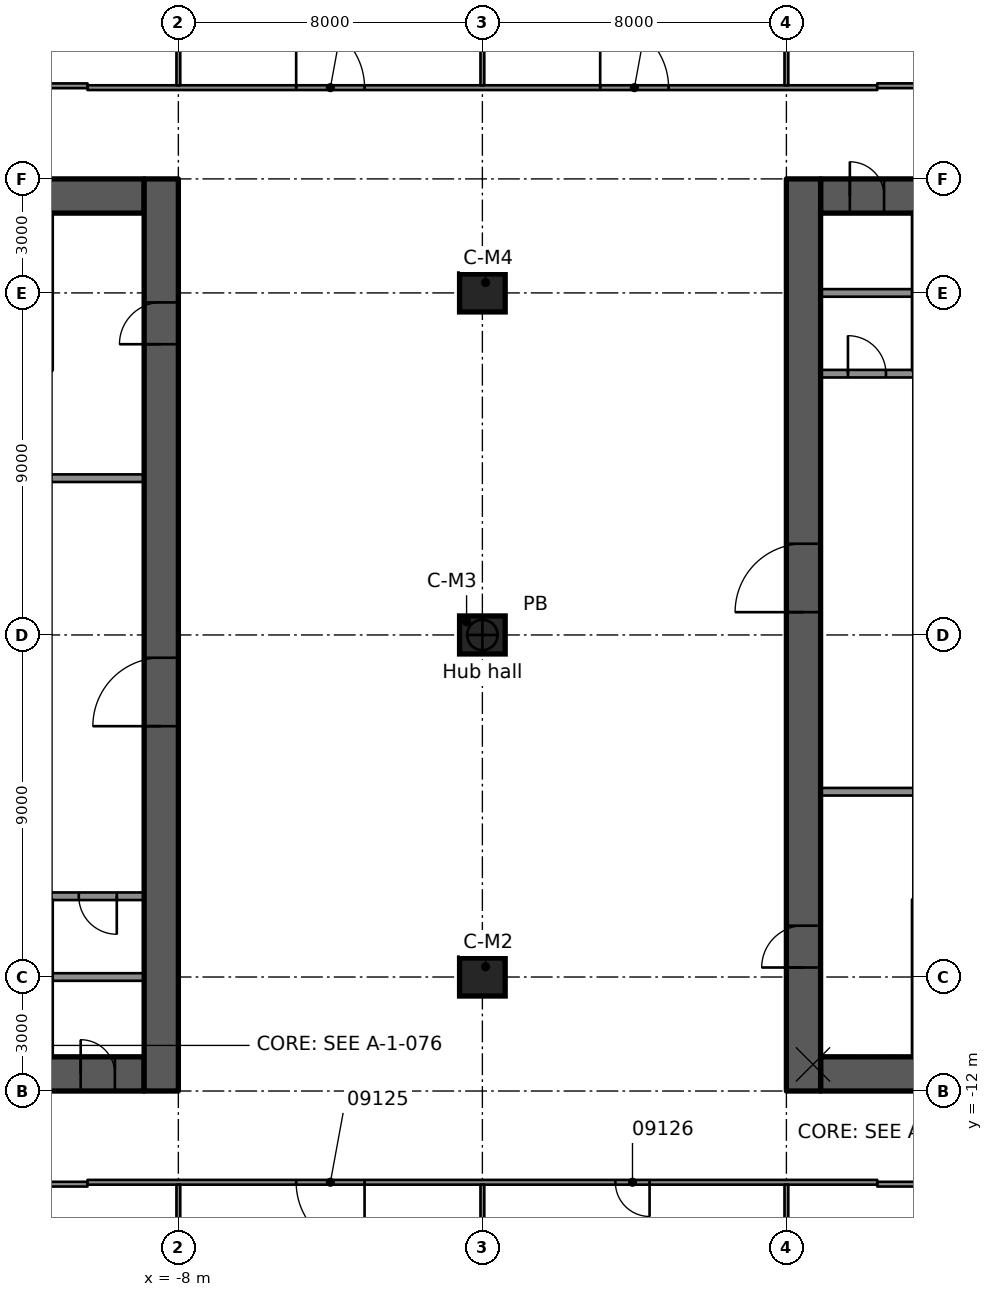
"""IFC4 building model, lengths in metres.
Left out: names, types, materials, properties, quantities, classifications, styles, units other than length and angle.
Written with IfcOpenShell. Run it as: python <this file> out.ifc"""

import sys

from ifc_helpers import new_model, si_unit, direction, frame, frame_2d, origin, origin_2d, place, context, subcontext, project, spatial, rectangle, extrude, element, fill, save


model = new_model("IFC4")
c1 = context("Model", 3, precision=1e-05, world=origin(), true_north=direction((0.0, 1.0)))
c2 = subcontext(c1, "Body", "Model", "MODEL_VIEW")
j1 = project(units=[si_unit("LENGTHUNIT", "METRE"), si_unit("PLANEANGLEUNIT", "RADIAN")], contexts=[c1])
p1 = place(None, origin())
s1 = spatial("IfcSite", under=j1, at=p1, CompositionType="ELEMENT")
p2 = place(p1, origin())
s2 = spatial("IfcBuilding", under=s1, at=p2, CompositionType="ELEMENT")
p3 = place(p2, frame((0.0, 0.0, 40.8)))
s3 = spatial("IfcBuildingStorey", under=s2, at=p3, CompositionType="ELEMENT", Elevation=40.8)
p4 = place(p3, frame((-18.1, 11.55, 0.0), z_axis=(0.0, 0.0, 1.0), x_axis=(1.0, 0.0, 0.0)))
e1 = element("IfcWall", 1, at=p4, inside=s3, PredefinedType="SHEAR", context=c2, shape_type="SweptSolid", body=[
    extrude(rectangle(XDim=9.2, YDim=0.9, at=frame_2d((4.6, 0.0))), origin(), (0.0, 0.0, 1.0), 3.5),
])
p5 = place(p4, frame((5.1, 0.0, 0.0)))
e2 = element("IfcOpeningElement", 2, at=p5, cuts=e1, PredefinedType="OPENING", context=c2, shape_type="SweptSolid", body=[
    extrude(rectangle(XDim=1.1, YDim=2.1, at=frame_2d((0.55, 1.05))), frame((0.0, 0.46, 0.0), z_axis=(0.0, -1.0, 0.0), x_axis=(1.0, 0.0, 0.0)), (0.0, 0.0, 1.0), 0.92),
])
p6 = place(p3, frame((-18.1, -11.55, 0.0), z_axis=(0.0, 0.0, 1.0), x_axis=(1.0, 0.0, 0.0)))
e3 = element("IfcWall", 3, at=p6, inside=s3, PredefinedType="SHEAR", context=c2, shape_type="SweptSolid", body=[
    extrude(rectangle(XDim=9.2, YDim=0.9, at=frame_2d((4.6, 0.0))), origin(), (0.0, 0.0, 1.0), 3.5),
])
p7 = place(p6, frame((5.1, 0.0, 0.0)))
e4 = element("IfcOpeningElement", 4, at=p7, cuts=e3, PredefinedType="OPENING", context=c2, shape_type="SweptSolid", body=[
    extrude(rectangle(XDim=1.1, YDim=2.1, at=frame_2d((0.55, 1.05))), frame((0.0, 0.46, 0.0), z_axis=(0.0, -1.0, 0.0), x_axis=(1.0, 0.0, 0.0)), (0.0, 0.0, 1.0), 0.92),
])
p8 = place(p6, frame((7.53, 0.0, 0.0)))
e5 = element("IfcOpeningElement", 5, at=p8, cuts=e3, PredefinedType="OPENING", context=c2, shape_type="SweptSolid", body=[
    extrude(rectangle(XDim=0.9, YDim=2.1, at=frame_2d((0.45, 1.05))), frame((0.0, 0.46, 0.0), z_axis=(0.0, -1.0, 0.0), x_axis=(1.0, 0.0, 0.0)), (0.0, 0.0, 1.0), 0.92),
])
p9 = place(p3, frame((-8.45, -12.0, 0.0), z_axis=(0.0, 0.0, 1.0), x_axis=(0.0, 1.0, 0.0)))
e6 = element("IfcWall", 6, at=p9, inside=s3, PredefinedType="SHEAR", context=c2, shape_type="SweptSolid", body=[
    extrude(rectangle(XDim=24.0, YDim=0.9, at=frame_2d((12.0, 0.0))), origin(), (0.0, 0.0, 1.0), 3.5),
])
p10 = place(p9, frame((9.6, 0.0, 0.0)))
e7 = element("IfcOpeningElement", 7, at=p10, cuts=e6, PredefinedType="OPENING", context=c2, shape_type="SweptSolid", body=[
    extrude(rectangle(XDim=1.8, YDim=2.1, at=frame_2d((0.9, 1.05))), frame((0.0, 0.46, 0.0), z_axis=(0.0, -1.0, 0.0), x_axis=(1.0, 0.0, 0.0)), (0.0, 0.0, 1.0), 0.92),
])
p11 = place(p9, frame((19.65, 0.0, 0.0)))
e8 = element("IfcOpeningElement", 8, at=p11, cuts=e6, PredefinedType="OPENING", context=c2, shape_type="SweptSolid", body=[
    extrude(rectangle(XDim=1.1, YDim=2.1, at=frame_2d((0.55, 1.05))), frame((0.0, 0.46, 0.0), z_axis=(0.0, -1.0, 0.0), x_axis=(1.0, 0.0, 0.0)), (0.0, 0.0, 1.0), 0.92),
])
p12 = place(p3, frame((8.9, 11.55, 0.0), z_axis=(0.0, 0.0, 1.0), x_axis=(1.0, 0.0, 0.0)))
e9 = element("IfcWall", 9, at=p12, inside=s3, PredefinedType="SHEAR", context=c2, shape_type="SweptSolid", body=[
    extrude(rectangle(XDim=9.2, YDim=0.9, at=frame_2d((4.6, 0.0))), origin(), (0.0, 0.0, 1.0), 3.5),
])
p13 = place(p12, frame((3.0, 0.0, 0.0)))
e10 = element("IfcOpeningElement", 10, at=p13, cuts=e9, PredefinedType="OPENING", context=c2, shape_type="SweptSolid", body=[
    extrude(rectangle(XDim=1.1, YDim=2.1, at=frame_2d((0.55, 1.05))), frame((0.0, 0.46, 0.0), z_axis=(0.0, -1.0, 0.0), x_axis=(1.0, 0.0, 0.0)), (0.0, 0.0, 1.0), 0.92),
])
p14 = place(p12, frame((0.77, 0.0, 0.0)))
e11 = element("IfcOpeningElement", 11, at=p14, cuts=e9, PredefinedType="OPENING", context=c2, shape_type="SweptSolid", body=[
    extrude(rectangle(XDim=0.9, YDim=2.1, at=frame_2d((0.45, 1.05))), frame((0.0, 0.46, 0.0), z_axis=(0.0, -1.0, 0.0), x_axis=(1.0, 0.0, 0.0)), (0.0, 0.0, 1.0), 0.92),
])
p15 = place(p3, frame((8.9, -11.55, 0.0), z_axis=(0.0, 0.0, 1.0), x_axis=(1.0, 0.0, 0.0)))
e12 = element("IfcWall", 12, at=p15, inside=s3, PredefinedType="SHEAR", context=c2, shape_type="SweptSolid", body=[
    extrude(rectangle(XDim=9.2, YDim=0.9, at=frame_2d((4.6, 0.0))), origin(), (0.0, 0.0, 1.0), 3.5),
])
p16 = place(p15, frame((3.0, 0.0, 0.0)))
e13 = element("IfcOpeningElement", 13, at=p16, cuts=e12, PredefinedType="OPENING", context=c2, shape_type="SweptSolid", body=[
    extrude(rectangle(XDim=1.1, YDim=2.1, at=frame_2d((0.55, 1.05))), frame((0.0, 0.46, 0.0), z_axis=(0.0, -1.0, 0.0), x_axis=(1.0, 0.0, 0.0)), (0.0, 0.0, 1.0), 0.92),
])
p17 = place(p3, frame((8.45, -12.0, 0.0), z_axis=(0.0, 0.0, 1.0), x_axis=(0.0, 1.0, 0.0)))
e14 = element("IfcWall", 14, at=p17, inside=s3, PredefinedType="SHEAR", context=c2, shape_type="SweptSolid", body=[
    extrude(rectangle(XDim=24.0, YDim=0.9, at=frame_2d((12.0, 0.0))), origin(), (0.0, 0.0, 1.0), 3.5),
])
p18 = place(p17, frame((12.6, 0.0, 0.0)))
e15 = element("IfcOpeningElement", 15, at=p18, cuts=e14, PredefinedType="OPENING", context=c2, shape_type="SweptSolid", body=[
    extrude(rectangle(XDim=1.8, YDim=2.1, at=frame_2d((0.9, 1.05))), frame((0.0, 0.46, 0.0), z_axis=(0.0, -1.0, 0.0), x_axis=(1.0, 0.0, 0.0)), (0.0, 0.0, 1.0), 0.92),
])
p19 = place(p17, frame((3.25, 0.0, 0.0)))
e16 = element("IfcOpeningElement", 16, at=p19, cuts=e14, PredefinedType="OPENING", context=c2, shape_type="SweptSolid", body=[
    extrude(rectangle(XDim=1.1, YDim=2.1, at=frame_2d((0.55, 1.05))), frame((0.0, 0.46, 0.0), z_axis=(0.0, -1.0, 0.0), x_axis=(1.0, 0.0, 0.0)), (0.0, 0.0, 1.0), 0.92),
])
for number, where, z_axis, x_axis in (
    (17, (0.0, -9.0, 0.0), (0.0, 0.0, 1.0), (1.0, 0.0, 0.0)),
    (18, (0.0, 0.0, 0.0), (0.0, 0.0, 1.0), (1.0, 0.0, 0.0)),
    (19, (0.0, 9.0, 0.0), (0.0, 0.0, 1.0), (1.0, 0.0, 0.0)),
):
    element("IfcColumn", number, at=place(p3, frame(where, z_axis=z_axis, x_axis=x_axis)), inside=s3, PredefinedType="COLUMN", context=c2, shape_type="SweptSolid", body=[
        extrude(rectangle(XDim=1.2, YDim=1.0, at=origin_2d()), origin(), (0.0, 0.0, 1.0), 3.5),
    ])
p20 = place(p3, frame((-8.9, 4.125, 0.0), z_axis=(0.0, 0.0, 1.0), x_axis=(-1.0, 0.0, 0.0)))
e20 = element("IfcWall", 20, at=p20, inside=s3, PredefinedType="PARTITIONING", context=c2, shape_type="SweptSolid", body=[
    extrude(rectangle(XDim=2.44, YDim=0.2, at=frame_2d((1.22, 0.0))), origin(), (0.0, 0.0, 1.0), 3.08),
])
p21 = place(p3, frame((-8.9, -6.875, 0.0), z_axis=(0.0, 0.0, 1.0), x_axis=(-1.0, 0.0, 0.0)))
e21 = element("IfcWall", 21, at=p21, inside=s3, PredefinedType="PARTITIONING", context=c2, shape_type="SweptSolid", body=[
    extrude(rectangle(XDim=2.44, YDim=0.2, at=frame_2d((1.22, 0.0))), origin(), (0.0, 0.0, 1.0), 3.08),
])
p22 = place(p21, frame((0.72, 0.0, 0.0)))
e22 = element("IfcOpeningElement", 22, at=p22, cuts=e21, PredefinedType="OPENING", context=c2, shape_type="SweptSolid", body=[
    extrude(rectangle(XDim=1.0, YDim=2.1, at=frame_2d((0.5, 1.05))), frame((0.0, 0.11, 0.0), z_axis=(0.0, -1.0, 0.0), x_axis=(1.0, 0.0, 0.0)), (0.0, 0.0, 1.0), 0.22),
])
for number, where, z_axis, x_axis in (
    (23, (-8.9, -9.0, 0.0), (0.0, 0.0, 1.0), (-1.0, 0.0, 0.0)),
    (24, (8.9, -4.125, 0.0), (0.0, 0.0, 1.0), (1.0, 0.0, 0.0)),
):
    element("IfcWall", number, at=place(p3, frame(where, z_axis=z_axis, x_axis=x_axis)), inside=s3, PredefinedType="PARTITIONING", context=c2, shape_type="SweptSolid", body=[
        extrude(rectangle(XDim=2.44, YDim=0.2, at=frame_2d((1.22, 0.0))), origin(), (0.0, 0.0, 1.0), 3.08),
    ])
p23 = place(p3, frame((8.9, 6.875, 0.0), z_axis=(0.0, 0.0, 1.0), x_axis=(1.0, 0.0, 0.0)))
e25 = element("IfcWall", 25, at=p23, inside=s3, PredefinedType="PARTITIONING", context=c2, shape_type="SweptSolid", body=[
    extrude(rectangle(XDim=2.44, YDim=0.2, at=frame_2d((1.22, 0.0))), origin(), (0.0, 0.0, 1.0), 3.08),
])
p24 = place(p23, frame((0.72, 0.0, 0.0)))
e26 = element("IfcOpeningElement", 26, at=p24, cuts=e25, PredefinedType="OPENING", context=c2, shape_type="SweptSolid", body=[
    extrude(rectangle(XDim=1.0, YDim=2.1, at=frame_2d((0.5, 1.05))), frame((0.0, 0.11, 0.0), z_axis=(0.0, -1.0, 0.0), x_axis=(1.0, 0.0, 0.0)), (0.0, 0.0, 1.0), 0.22),
])
p25 = place(p3, frame((8.9, 9.0, 0.0), z_axis=(0.0, 0.0, 1.0), x_axis=(1.0, 0.0, 0.0)))
e27 = element("IfcWall", 27, at=p25, inside=s3, PredefinedType="PARTITIONING", context=c2, shape_type="SweptSolid", body=[
    extrude(rectangle(XDim=2.44, YDim=0.2, at=frame_2d((1.22, 0.0))), origin(), (0.0, 0.0, 1.0), 3.08),
])
p26 = place(p3, frame((-10.391, -14.451, 0.0), z_axis=(0.0, 0.0, 1.0), x_axis=(-1.0, 0.0, 0.0)))
e28 = element("IfcWall", 28, at=p26, inside=s3, PredefinedType="PARTITIONING", context=c2, shape_type="SweptSolid", body=[
    extrude(rectangle(XDim=4.947, YDim=0.125, at=frame_2d((2.473, 0.0))), origin(), (0.0, 0.0, 1.0), 3.06),
])
p27 = place(p26, frame((1.6, 0.0, 0.0)))
e29 = element("IfcOpeningElement", 29, at=p27, cuts=e28, PredefinedType="OPENING", context=c2, shape_type="SweptSolid", body=[
    extrude(rectangle(XDim=1.8, YDim=2.1, at=frame_2d((0.9, 1.05))), frame((0.0, 0.073, 0.0), z_axis=(0.0, -1.0, 0.0), x_axis=(1.0, 0.0, 0.0)), (0.0, 0.0, 1.0), 0.145),
])
p28 = place(p3, frame((17.519, -14.451, 0.0), z_axis=(0.0, 0.0, 1.0), x_axis=(-1.0, 0.0, 0.0)))
e30 = element("IfcWall", 30, at=p28, inside=s3, PredefinedType="PARTITIONING", context=c2, shape_type="SweptSolid", body=[
    extrude(rectangle(XDim=7.128, YDim=0.125, at=frame_2d((3.564, 0.0))), origin(), (0.0, 0.0, 1.0), 3.06),
])
p29 = place(p28, frame((3.1, 0.0, 0.0)))
e31 = element("IfcOpeningElement", 31, at=p29, cuts=e30, PredefinedType="OPENING", context=c2, shape_type="SweptSolid", body=[
    extrude(rectangle(XDim=0.9, YDim=2.1, at=frame_2d((0.45, 1.05))), frame((0.0, 0.073, 0.0), z_axis=(0.0, -1.0, 0.0), x_axis=(1.0, 0.0, 0.0)), (0.0, 0.0, 1.0), 0.145),
])
p30 = place(p3, frame((10.391, -14.401, 0.0), z_axis=(0.0, 0.0, 1.0), x_axis=(-1.0, 0.0, 0.0)))
e32 = element("IfcWall", 32, at=p30, inside=s3, PredefinedType="PARTITIONING", context=c2, shape_type="SweptSolid", body=[
    extrude(rectangle(XDim=20.781, YDim=0.125, at=frame_2d((10.391, 0.0))), origin(), (0.0, 0.0, 1.0), 3.06),
])
p31 = place(p30, frame((13.491, 0.0, 0.0)))
e33 = element("IfcOpeningElement", 33, at=p31, cuts=e32, PredefinedType="OPENING", context=c2, shape_type="SweptSolid", body=[
    extrude(rectangle(XDim=1.8, YDim=2.1, at=frame_2d((0.9, 1.05))), frame((0.0, 0.073, 0.0), z_axis=(0.0, -1.0, 0.0), x_axis=(1.0, 0.0, 0.0)), (0.0, 0.0, 1.0), 0.145),
])
p32 = place(p30, frame((5.991, 0.0, 0.0)))
e34 = element("IfcOpeningElement", 34, at=p32, cuts=e32, PredefinedType="OPENING", context=c2, shape_type="SweptSolid", body=[
    extrude(rectangle(XDim=0.9, YDim=2.1, at=frame_2d((0.45, 1.05))), frame((0.0, 0.073, 0.0), z_axis=(0.0, -1.0, 0.0), x_axis=(1.0, 0.0, 0.0)), (0.0, 0.0, 1.0), 0.145),
])
p33 = place(p3, frame((-10.39, 14.401, 0.0), z_axis=(0.0, 0.0, 1.0), x_axis=(1.0, 0.0, 0.0)))
e35 = element("IfcWall", 35, at=p33, inside=s3, PredefinedType="PARTITIONING", context=c2, shape_type="SweptSolid", body=[
    extrude(rectangle(XDim=20.781, YDim=0.125, at=frame_2d((10.391, 0.0))), origin(), (0.0, 0.0, 1.0), 3.06),
])
p34 = place(p33, frame((13.49, 0.0, 0.0)))
e36 = element("IfcOpeningElement", 36, at=p34, cuts=e35, PredefinedType="OPENING", context=c2, shape_type="SweptSolid", body=[
    extrude(rectangle(XDim=1.8, YDim=2.1, at=frame_2d((0.9, 1.05))), frame((0.0, 0.073, 0.0), z_axis=(0.0, -1.0, 0.0), x_axis=(1.0, 0.0, 0.0)), (0.0, 0.0, 1.0), 0.145),
])
p35 = place(p33, frame((5.49, 0.0, 0.0)))
e37 = element("IfcOpeningElement", 37, at=p35, cuts=e35, PredefinedType="OPENING", context=c2, shape_type="SweptSolid", body=[
    extrude(rectangle(XDim=1.8, YDim=2.1, at=frame_2d((0.9, 1.05))), frame((0.0, 0.073, 0.0), z_axis=(0.0, -1.0, 0.0), x_axis=(1.0, 0.0, 0.0)), (0.0, 0.0, 1.0), 0.145),
])
p36 = place(p3, frame((-24.731, 14.45, 0.0), z_axis=(0.0, 0.0, 1.0), x_axis=(1.0, 0.0, 0.0)))
e38 = element("IfcWall", 38, at=p36, inside=s3, PredefinedType="PARTITIONING", context=c2, shape_type="SweptSolid", body=[
    extrude(rectangle(XDim=14.34, YDim=0.125, at=frame_2d((7.17, 0.0))), origin(), (0.0, 0.0, 1.0), 3.06),
])
p37 = place(p36, frame((8.581, 0.0, 0.0)))
e39 = element("IfcOpeningElement", 39, at=p37, cuts=e38, PredefinedType="OPENING", context=c2, shape_type="SweptSolid", body=[
    extrude(rectangle(XDim=1.8, YDim=2.1, at=frame_2d((0.9, 1.05))), frame((0.0, 0.073, 0.0), z_axis=(0.0, -1.0, 0.0), x_axis=(1.0, 0.0, 0.0)), (0.0, 0.0, 1.0), 0.145),
])
p38 = place(p3, frame((10.391, 14.451, 0.0), z_axis=(0.0, 0.0, 1.0), x_axis=(1.0, 0.0, 0.0)))
e40 = element("IfcWall", 40, at=p38, inside=s3, PredefinedType="PARTITIONING", context=c2, shape_type="SweptSolid", body=[
    extrude(rectangle(XDim=10.996, YDim=0.125, at=frame_2d((5.498, 0.0))), origin(), (0.0, 0.0, 1.0), 3.06),
])
p39 = place(p38, frame((3.85, 0.0, 0.0)))
e41 = element("IfcOpeningElement", 41, at=p39, cuts=e40, PredefinedType="OPENING", context=c2, shape_type="SweptSolid", body=[
    extrude(rectangle(XDim=1.8, YDim=2.1, at=frame_2d((0.9, 1.05))), frame((0.0, 0.073, 0.0), z_axis=(0.0, -1.0, 0.0), x_axis=(1.0, 0.0, 0.0)), (0.0, 0.0, 1.0), 0.145),
])
p40 = place(p3, frame((8.0, -29.605, 0.0), z_axis=(0.0, 0.0, 1.0), x_axis=(0.0, 1.0, 0.0)))
e42 = element("IfcWall", 42, at=p40, inside=s3, PredefinedType="PARTITIONING", context=c2, shape_type="SweptSolid", body=[
    extrude(rectangle(XDim=15.142, YDim=0.1, at=frame_2d((7.571, 0.0))), origin(), (0.0, 0.0, 1.0), 3.06),
])
p41 = place(p3, frame((8.0, 14.463, 0.0), z_axis=(0.0, 0.0, 1.0), x_axis=(0.0, 1.0, 0.0)))
e43 = element("IfcWall", 43, at=p41, inside=s3, PredefinedType="PARTITIONING", context=c2, shape_type="SweptSolid", body=[
    extrude(rectangle(XDim=16.729, YDim=0.1, at=frame_2d((8.365, 0.0))), origin(), (0.0, 0.0, 1.0), 3.06),
])
for number, where, z_axis, x_axis in (
    (44, (0.0, -30.398, 0.0), (0.0, 0.0, 1.0), (0.0, 1.0, 0.0)),
    (45, (0.0, 14.463, 0.0), (0.0, 0.0, 1.0), (0.0, 1.0, 0.0)),
):
    element("IfcWall", number, at=place(p3, frame(where, z_axis=z_axis, x_axis=x_axis)), inside=s3, PredefinedType="PARTITIONING", context=c2, shape_type="SweptSolid", body=[
        extrude(rectangle(XDim=15.935, YDim=0.1, at=frame_2d((7.968, 0.0))), origin(), (0.0, 0.0, 1.0), 3.06),
    ])
p42 = place(p3, frame((-8.0, -35.268, 0.0), z_axis=(0.0, 0.0, 1.0), x_axis=(0.0, 1.0, 0.0)))
e46 = element("IfcWall", 46, at=p42, inside=s3, PredefinedType="PARTITIONING", context=c2, shape_type="SweptSolid", body=[
    extrude(rectangle(XDim=20.805, YDim=0.1, at=frame_2d((10.403, 0.0))), origin(), (0.0, 0.0, 1.0), 3.06),
])
p43 = place(p3, frame((-8.0, 14.463, 0.0), z_axis=(0.0, 0.0, 1.0), x_axis=(0.0, 1.0, 0.0)))
e47 = element("IfcWall", 47, at=p43, inside=s3, PredefinedType="PARTITIONING", context=c2, shape_type="SweptSolid", body=[
    extrude(rectangle(XDim=15.142, YDim=0.1, at=frame_2d((7.571, 0.0))), origin(), (0.0, 0.0, 1.0), 3.06),
])
p44 = place(p10, origin())
e48 = element("IfcDoor", 48, at=p44, inside=s3, OperationType="SINGLE_SWING_LEFT", PredefinedType="DOOR", context=c2, shape_type="SweptSolid", body=[
    extrude(rectangle(XDim=1.8, YDim=2.1, at=frame_2d((0.9, 1.05))), frame((0.0, 0.025, 0.0), z_axis=(0.0, -1.0, 0.0), x_axis=(1.0, 0.0, 0.0)), (0.0, 0.0, 1.0), 0.05),
])
fill(e7, e48)
p45 = place(p11, origin())
e49 = element("IfcDoor", 49, at=p45, inside=s3, OperationType="SINGLE_SWING_RIGHT", PredefinedType="DOOR", context=c2, shape_type="SweptSolid", body=[
    extrude(rectangle(XDim=1.1, YDim=2.1, at=frame_2d((0.55, 1.05))), frame((0.0, 0.025, 0.0), z_axis=(0.0, -1.0, 0.0), x_axis=(1.0, 0.0, 0.0)), (0.0, 0.0, 1.0), 0.05),
])
fill(e8, e49)
p46 = place(p8, origin())
e50 = element("IfcDoor", 50, at=p46, inside=s3, OperationType="SINGLE_SWING_RIGHT", PredefinedType="DOOR", context=c2, shape_type="SweptSolid", body=[
    extrude(rectangle(XDim=0.9, YDim=2.1, at=frame_2d((0.45, 1.05))), frame((0.0, 0.025, 0.0), z_axis=(0.0, -1.0, 0.0), x_axis=(1.0, 0.0, 0.0)), (0.0, 0.0, 1.0), 0.05),
])
fill(e5, e50)
p47 = place(p22, origin())
e51 = element("IfcDoor", 51, at=p47, inside=s3, OperationType="SINGLE_SWING_RIGHT", PredefinedType="DOOR", context=c2, shape_type="SweptSolid", body=[
    extrude(rectangle(XDim=1.0, YDim=2.1, at=frame_2d((0.5, 1.05))), frame((0.0, 0.025, 0.0), z_axis=(0.0, -1.0, 0.0), x_axis=(1.0, 0.0, 0.0)), (0.0, 0.0, 1.0), 0.05),
])
fill(e22, e51)
p48 = place(p18, origin())
e52 = element("IfcDoor", 52, at=p48, inside=s3, OperationType="SINGLE_SWING_RIGHT", PredefinedType="DOOR", context=c2, shape_type="SweptSolid", body=[
    extrude(rectangle(XDim=1.8, YDim=2.1, at=frame_2d((0.9, 1.05))), frame((0.0, 0.025, 0.0), z_axis=(0.0, -1.0, 0.0), x_axis=(1.0, 0.0, 0.0)), (0.0, 0.0, 1.0), 0.05),
])
fill(e15, e52)
p49 = place(p19, origin())
e53 = element("IfcDoor", 53, at=p49, inside=s3, OperationType="SINGLE_SWING_LEFT", PredefinedType="DOOR", context=c2, shape_type="SweptSolid", body=[
    extrude(rectangle(XDim=1.1, YDim=2.1, at=frame_2d((0.55, 1.05))), frame((0.0, 0.025, 0.0), z_axis=(0.0, -1.0, 0.0), x_axis=(1.0, 0.0, 0.0)), (0.0, 0.0, 1.0), 0.05),
])
fill(e16, e53)
p50 = place(p14, origin())
e54 = element("IfcDoor", 54, at=p50, inside=s3, OperationType="SINGLE_SWING_LEFT", PredefinedType="DOOR", context=c2, shape_type="SweptSolid", body=[
    extrude(rectangle(XDim=0.9, YDim=2.1, at=frame_2d((0.45, 1.05))), frame((0.0, 0.025, 0.0), z_axis=(0.0, -1.0, 0.0), x_axis=(1.0, 0.0, 0.0)), (0.0, 0.0, 1.0), 0.05),
])
fill(e11, e54)
p51 = place(p24, origin())
e55 = element("IfcDoor", 55, at=p51, inside=s3, OperationType="SINGLE_SWING_RIGHT", PredefinedType="DOOR", context=c2, shape_type="SweptSolid", body=[
    extrude(rectangle(XDim=1.0, YDim=2.1, at=frame_2d((0.5, 1.05))), frame((0.0, 0.025, 0.0), z_axis=(0.0, -1.0, 0.0), x_axis=(1.0, 0.0, 0.0)), (0.0, 0.0, 1.0), 0.05),
])
fill(e26, e55)
p52 = place(p31, origin())
e56 = element("IfcDoor", 56, at=p52, inside=s3, OperationType="DOUBLE_DOOR_SINGLE_SWING", PredefinedType="DOOR", context=c2, shape_type="SweptSolid", body=[
    extrude(rectangle(XDim=1.8, YDim=2.1, at=frame_2d((0.9, 1.05))), frame((0.0, 0.025, 0.0), z_axis=(0.0, -1.0, 0.0), x_axis=(1.0, 0.0, 0.0)), (0.0, 0.0, 1.0), 0.05),
])
fill(e33, e56)
p53 = place(p32, origin())
e57 = element("IfcDoor", 57, at=p53, inside=s3, OperationType="SINGLE_SWING_LEFT", PredefinedType="DOOR", context=c2, shape_type="SweptSolid", body=[
    extrude(rectangle(XDim=0.9, YDim=2.1, at=frame_2d((0.45, 1.05))), frame((0.0, 0.025, 0.0), z_axis=(0.0, -1.0, 0.0), x_axis=(1.0, 0.0, 0.0)), (0.0, 0.0, 1.0), 0.05),
])
fill(e34, e57)
p54 = place(p34, origin())
e58 = element("IfcDoor", 58, at=p54, inside=s3, OperationType="DOUBLE_DOOR_SINGLE_SWING", PredefinedType="DOOR", context=c2, shape_type="SweptSolid", body=[
    extrude(rectangle(XDim=1.8, YDim=2.1, at=frame_2d((0.9, 1.05))), frame((0.0, 0.025, 0.0), z_axis=(0.0, -1.0, 0.0), x_axis=(1.0, 0.0, 0.0)), (0.0, 0.0, 1.0), 0.05),
])
fill(e36, e58)
p55 = place(p35, origin())
e59 = element("IfcDoor", 59, at=p55, inside=s3, OperationType="DOUBLE_DOOR_SINGLE_SWING", PredefinedType="DOOR", context=c2, shape_type="SweptSolid", body=[
    extrude(rectangle(XDim=1.8, YDim=2.1, at=frame_2d((0.9, 1.05))), frame((0.0, 0.025, 0.0), z_axis=(0.0, -1.0, 0.0), x_axis=(1.0, 0.0, 0.0)), (0.0, 0.0, 1.0), 0.05),
])
fill(e37, e59)
save(model, sys.argv[1])
